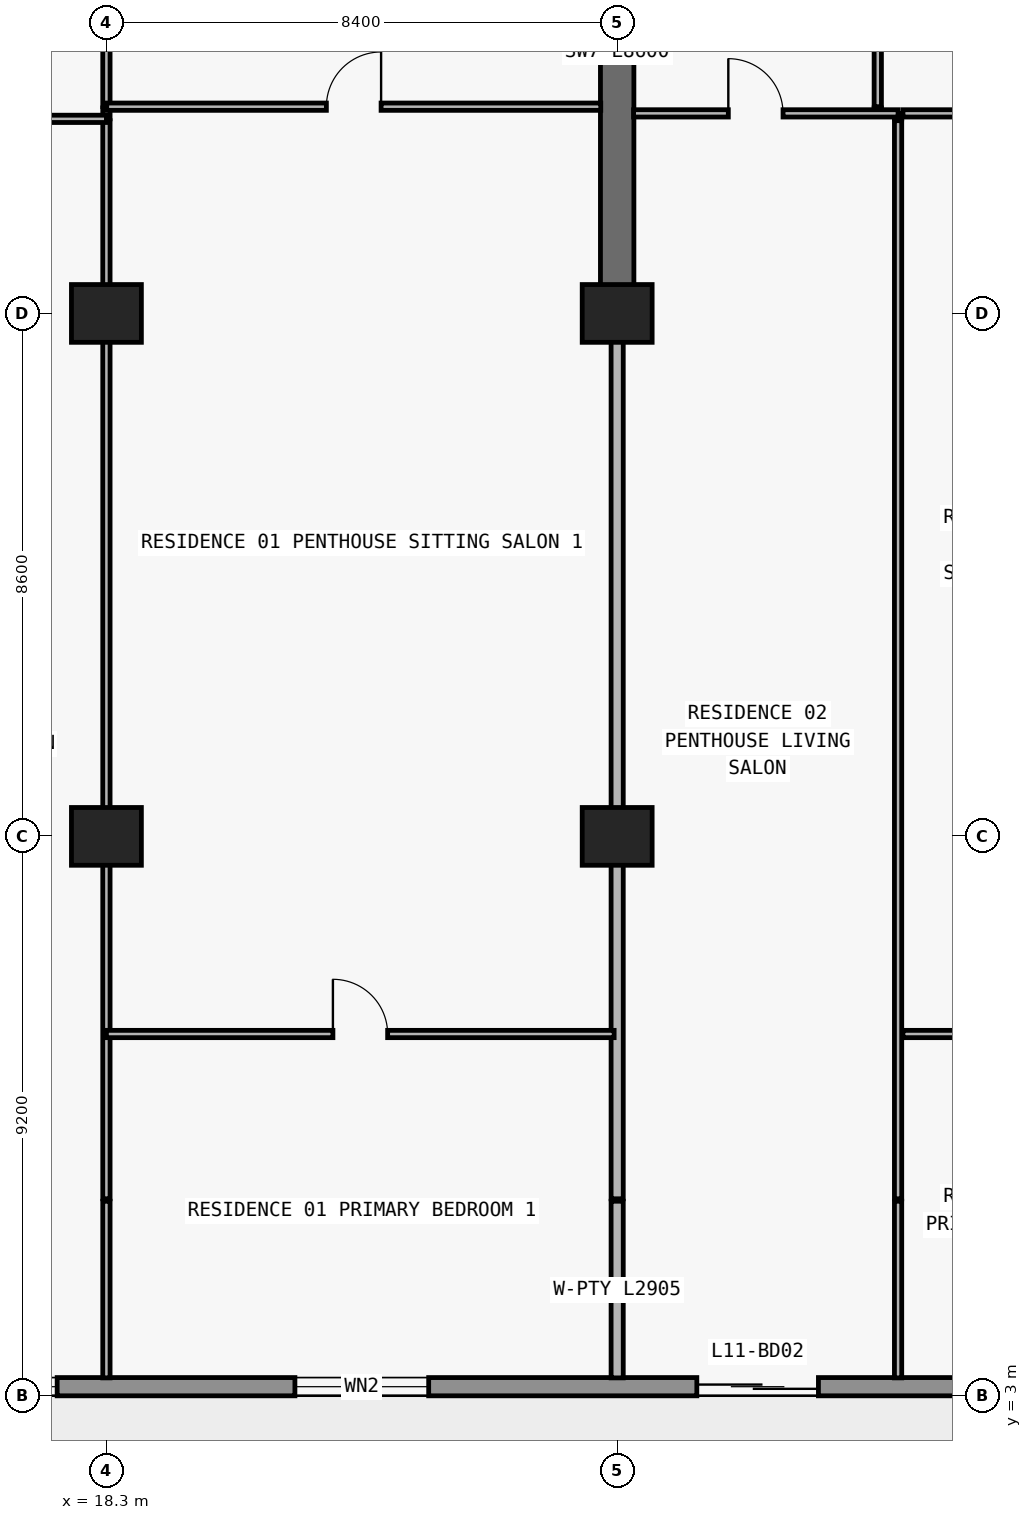
"""IFC4 building model, lengths in metres.
Left out: names, types, materials, properties, quantities, classifications, styles, units other than length and angle.
Written with IfcOpenShell. Run it as: python <this file> out.ifc"""

import sys

from ifc_helpers import new_model, si_unit, direction, frame, frame_2d, origin, origin_2d, place, context, subcontext, project, spatial, rectangle, extrude, element, fill, save


model = new_model("IFC4")
c1 = context("Model", 3, precision=1e-05, world=origin(), true_north=direction((0.0, 1.0)))
c2 = subcontext(c1, "Body", "Model", "MODEL_VIEW")
j1 = project(units=[si_unit("LENGTHUNIT", "METRE"), si_unit("PLANEANGLEUNIT", "RADIAN")], contexts=[c1])
p1 = place(None, origin())
s1 = spatial("IfcSite", under=j1, at=p1, CompositionType="ELEMENT")
p2 = place(p1, origin())
s2 = spatial("IfcBuilding", under=s1, at=p2, CompositionType="ELEMENT")
p3 = place(p2, frame((0.0, 0.0, 46.5)))
s3 = spatial("IfcBuildingStorey", under=s2, at=p3, CompositionType="ELEMENT", Elevation=46.5)
for number, where, z_axis, x_axis in (
    (1, (18.3, 12.2, 0.0), (0.0, 0.0, 1.0), (1.0, 0.0, 0.0)),
    (2, (26.7, 12.2, 0.0), (0.0, 0.0, 1.0), (1.0, 0.0, 0.0)),
    (3, (18.3, 20.8, 0.0), (0.0, 0.0, 1.0), (1.0, 0.0, 0.0)),
    (4, (26.7, 20.8, 0.0), (0.0, 0.0, 1.0), (1.0, 0.0, 0.0)),
):
    element("IfcColumn", number, at=place(p3, frame(where, z_axis=z_axis, x_axis=x_axis)), inside=s3, PredefinedType="COLUMN", context=c2, shape_type="SweptSolid", body=[
        extrude(rectangle(XDim=1.15, YDim=0.95, at=origin_2d()), origin(), (0.0, 0.0, 1.0), 3.05),
    ])
p4 = place(p3, frame((26.7, 20.8, 0.0), z_axis=(0.0, 0.0, 1.0), x_axis=(0.0, 1.0, 0.0)))
e5 = element("IfcWall", 5, at=p4, inside=s3, PredefinedType="SHEAR", context=c2, shape_type="SweptSolid", body=[
    extrude(rectangle(XDim=8.6, YDim=0.55, at=frame_2d((4.3, 0.0))), origin(), (0.0, 0.0, 1.0), 3.05),
])
p5 = place(p3, frame((72.7, 3.15, 0.0), z_axis=(0.0, 0.0, 1.0), x_axis=(-1.0, 0.0, 0.0)))
e6 = element("IfcWall", 6, at=p5, inside=s3, PredefinedType="STANDARD", context=c2, shape_type="SweptSolid", body=[
    extrude(rectangle(XDim=67.6, YDim=0.3, at=frame_2d((33.8, 0.0))), origin(), (0.0, 0.0, 1.0), 3.05),
])
p6 = place(p5, frame((59.89, 0.0, 0.0)))
e7 = element("IfcOpeningElement", 7, at=p6, cuts=e6, PredefinedType="OPENING", context=c2, shape_type="SweptSolid", body=[
    extrude(rectangle(XDim=2.0, YDim=2.3, at=frame_2d((1.0, 1.15))), frame((0.0, 0.16, 0.0), z_axis=(0.0, -1.0, 0.0), x_axis=(1.0, 0.0, 0.0)), (0.0, 0.0, 1.0), 0.32),
])
p7 = place(p5, frame((55.21, 0.0, 0.65)))
e8 = element("IfcOpeningElement", 8, at=p7, cuts=e6, PredefinedType="OPENING", context=c2, shape_type="SweptSolid", body=[
    extrude(rectangle(XDim=2.6, YDim=1.85, at=frame_2d((1.3, 0.925))), frame((0.0, 0.16, 0.0), z_axis=(0.0, -1.0, 0.0), x_axis=(1.0, 0.0, 0.0)), (0.0, 0.0, 1.0), 0.32),
])
p8 = place(p5, frame((49.1, 0.0, 0.85)))
e9 = element("IfcOpeningElement", 9, at=p8, cuts=e6, PredefinedType="OPENING", context=c2, shape_type="SweptSolid", body=[
    extrude(rectangle(XDim=2.2, YDim=1.55, at=frame_2d((1.1, 0.775))), frame((0.0, 0.16, 0.0), z_axis=(0.0, -1.0, 0.0), x_axis=(1.0, 0.0, 0.0)), (0.0, 0.0, 1.0), 0.32),
])
p9 = place(p5, frame((42.69, 0.0, 0.0)))
e10 = element("IfcOpeningElement", 10, at=p9, cuts=e6, PredefinedType="OPENING", context=c2, shape_type="SweptSolid", body=[
    extrude(rectangle(XDim=2.0, YDim=2.3, at=frame_2d((1.0, 1.15))), frame((0.0, 0.16, 0.0), z_axis=(0.0, -1.0, 0.0), x_axis=(1.0, 0.0, 0.0)), (0.0, 0.0, 1.0), 0.32),
])
p10 = place(p5, frame((38.59, 0.0, 0.85)))
e11 = element("IfcOpeningElement", 11, at=p10, cuts=e6, PredefinedType="OPENING", context=c2, shape_type="SweptSolid", body=[
    extrude(rectangle(XDim=1.8, YDim=1.55, at=frame_2d((0.9, 0.775))), frame((0.0, 0.16, 0.0), z_axis=(0.0, -1.0, 0.0), x_axis=(1.0, 0.0, 0.0)), (0.0, 0.0, 1.0), 0.32),
])
p11 = place(p5, frame((30.914, 0.0, 0.85)))
e12 = element("IfcOpeningElement", 12, at=p11, cuts=e6, PredefinedType="OPENING", context=c2, shape_type="SweptSolid", body=[
    extrude(rectangle(XDim=2.2, YDim=1.55, at=frame_2d((1.1, 0.775))), frame((0.0, 0.16, 0.0), z_axis=(0.0, -1.0, 0.0), x_axis=(1.0, 0.0, 0.0)), (0.0, 0.0, 1.0), 0.32),
])
p12 = place(p5, frame((26.69, 0.0, 0.0)))
e13 = element("IfcOpeningElement", 13, at=p12, cuts=e6, PredefinedType="OPENING", context=c2, shape_type="SweptSolid", body=[
    extrude(rectangle(XDim=2.0, YDim=2.3, at=frame_2d((1.0, 1.15))), frame((0.0, 0.16, 0.0), z_axis=(0.0, -1.0, 0.0), x_axis=(1.0, 0.0, 0.0)), (0.0, 0.0, 1.0), 0.32),
])
p13 = place(p5, frame((22.59, 0.0, 0.85)))
e14 = element("IfcOpeningElement", 14, at=p13, cuts=e6, PredefinedType="OPENING", context=c2, shape_type="SweptSolid", body=[
    extrude(rectangle(XDim=1.8, YDim=1.55, at=frame_2d((0.9, 0.775))), frame((0.0, 0.16, 0.0), z_axis=(0.0, -1.0, 0.0), x_axis=(1.0, 0.0, 0.0)), (0.0, 0.0, 1.0), 0.32),
])
p14 = place(p5, frame((18.69, 0.0, 0.0)))
e15 = element("IfcOpeningElement", 15, at=p14, cuts=e6, PredefinedType="OPENING", context=c2, shape_type="SweptSolid", body=[
    extrude(rectangle(XDim=2.0, YDim=2.3, at=frame_2d((1.0, 1.15))), frame((0.0, 0.16, 0.0), z_axis=(0.0, -1.0, 0.0), x_axis=(1.0, 0.0, 0.0)), (0.0, 0.0, 1.0), 0.32),
])
p15 = place(p5, frame((14.01, 0.0, 0.65)))
e16 = element("IfcOpeningElement", 16, at=p15, cuts=e6, PredefinedType="OPENING", context=c2, shape_type="SweptSolid", body=[
    extrude(rectangle(XDim=2.6, YDim=1.85, at=frame_2d((1.3, 0.925))), frame((0.0, 0.16, 0.0), z_axis=(0.0, -1.0, 0.0), x_axis=(1.0, 0.0, 0.0)), (0.0, 0.0, 1.0), 0.32),
])
p16 = place(p5, frame((7.9, 0.0, 0.85)))
e17 = element("IfcOpeningElement", 17, at=p16, cuts=e6, PredefinedType="OPENING", context=c2, shape_type="SweptSolid", body=[
    extrude(rectangle(XDim=2.2, YDim=1.55, at=frame_2d((1.1, 0.775))), frame((0.0, 0.16, 0.0), z_axis=(0.0, -1.0, 0.0), x_axis=(1.0, 0.0, 0.0)), (0.0, 0.0, 1.0), 0.32),
])
p17 = place(p3, frame((18.3, 3.295, 0.0), z_axis=(0.0, 0.0, 1.0), x_axis=(0.0, 1.0, 0.0)))
e18 = element("IfcWall", 18, at=p17, inside=s3, PredefinedType="PARTITIONING", context=c2, shape_type="SweptSolid", body=[
    extrude(rectangle(XDim=2.905, YDim=0.12, at=frame_2d((1.453, 0.0))), origin(), (0.0, 0.0, 1.0), 3.05),
])
p18 = place(p3, frame((18.3, 6.24, 0.0), z_axis=(0.0, 0.0, 1.0), x_axis=(0.0, 1.0, 0.0)))
e19 = element("IfcWall", 19, at=p18, inside=s3, PredefinedType="PARTITIONING", context=c2, shape_type="SweptSolid", body=[
    extrude(rectangle(XDim=17.73, YDim=0.12, at=frame_2d((8.865, 0.0))), origin(), (0.0, 0.0, 1.0), 2.11),
])
p19 = place(p3, frame((18.3, 24.0, 0.0), z_axis=(0.0, 0.0, 1.0), x_axis=(0.0, 1.0, 0.0)))
e20 = element("IfcWall", 20, at=p19, inside=s3, PredefinedType="PARTITIONING", context=c2, shape_type="SweptSolid", body=[
    extrude(rectangle(XDim=0.18, YDim=0.12, at=frame_2d((0.09, 0.0))), origin(), (0.0, 0.0, 1.0), 2.11),
])
p20 = place(p3, frame((18.3, 24.2, 0.0), z_axis=(0.0, 0.0, 1.0), x_axis=(0.0, 1.0, 0.0)))
e21 = element("IfcWall", 21, at=p20, inside=s3, PredefinedType="PARTITIONING", context=c2, shape_type="SweptSolid", body=[
    extrude(rectangle(XDim=4.38, YDim=0.12, at=frame_2d((2.19, 0.0))), origin(), (0.0, 0.0, 1.0), 2.11),
])
p21 = place(p20, frame((1.74, 0.0, 0.0)))
e22 = element("IfcOpeningElement", 22, at=p21, cuts=e21, PredefinedType="OPENING", context=c2, shape_type="SweptSolid", body=[
    extrude(rectangle(XDim=0.9, YDim=2.06, at=frame_2d((0.45, 1.03))), frame((0.0, 0.07, 0.0), z_axis=(0.0, -1.0, 0.0), x_axis=(1.0, 0.0, 0.0)), (0.0, 0.0, 1.0), 0.14),
])
p22 = place(p3, frame((26.7, 3.295, 0.0), z_axis=(0.0, 0.0, 1.0), x_axis=(0.0, 1.0, 0.0)))
e23 = element("IfcWall", 23, at=p22, inside=s3, PredefinedType="PARTITIONING", context=c2, shape_type="SweptSolid", body=[
    extrude(rectangle(XDim=2.905, YDim=0.2, at=frame_2d((1.453, 0.0))), origin(), (0.0, 0.0, 1.0), 3.05),
])
p23 = place(p3, frame((26.7, 6.24, 0.0), z_axis=(0.0, 0.0, 1.0), x_axis=(0.0, 1.0, 0.0)))
e24 = element("IfcWall", 24, at=p23, inside=s3, PredefinedType="PARTITIONING", context=c2, shape_type="SweptSolid", body=[
    extrude(rectangle(XDim=14.555, YDim=0.2, at=frame_2d((7.277, 0.0))), origin(), (0.0, 0.0, 1.0), 2.11),
])
p24 = place(p3, frame((30.986, 24.09, 0.0), z_axis=(0.0, 0.0, 1.0), x_axis=(0.0, 1.0, 0.0)))
e25 = element("IfcWall", 25, at=p24, inside=s3, PredefinedType="PARTITIONING", context=c2, shape_type="SweptSolid", body=[
    extrude(rectangle(XDim=0.09, YDim=0.12, at=frame_2d((0.045, 0.0))), origin(), (0.0, 0.0, 1.0), 3.05),
])
p25 = place(p3, frame((30.986, 24.2, 0.0), z_axis=(0.0, 0.0, 1.0), x_axis=(0.0, 1.0, 0.0)))
e26 = element("IfcWall", 26, at=p25, inside=s3, PredefinedType="PARTITIONING", context=c2, shape_type="SweptSolid", body=[
    extrude(rectangle(XDim=4.38, YDim=0.12, at=frame_2d((2.19, 0.0))), origin(), (0.0, 0.0, 1.0), 3.05),
])
p26 = place(p25, frame((1.74, 0.0, 0.0)))
e27 = element("IfcOpeningElement", 27, at=p26, cuts=e26, PredefinedType="OPENING", context=c2, shape_type="SweptSolid", body=[
    extrude(rectangle(XDim=0.9, YDim=2.15, at=frame_2d((0.45, 1.075))), frame((0.0, 0.07, 0.0), z_axis=(0.0, -1.0, 0.0), x_axis=(1.0, 0.0, 0.0)), (0.0, 0.0, 1.0), 0.14),
])
p27 = place(p3, frame((31.32, 3.295, 0.0), z_axis=(0.0, 0.0, 1.0), x_axis=(0.0, 1.0, 0.0)))
e28 = element("IfcWall", 28, at=p27, inside=s3, PredefinedType="PARTITIONING", context=c2, shape_type="SweptSolid", body=[
    extrude(rectangle(XDim=2.905, YDim=0.12, at=frame_2d((1.453, 0.0))), origin(), (0.0, 0.0, 1.0), 3.05),
])
p28 = place(p3, frame((31.32, 6.24, 0.0), z_axis=(0.0, 0.0, 1.0), x_axis=(0.0, 1.0, 0.0)))
e29 = element("IfcWall", 29, at=p28, inside=s3, PredefinedType="PARTITIONING", context=c2, shape_type="SweptSolid", body=[
    extrude(rectangle(XDim=17.73, YDim=0.12, at=frame_2d((8.865, 0.0))), origin(), (0.0, 0.0, 1.0), 3.05),
])
p29 = place(p3, frame((31.32, 24.0, 0.0), z_axis=(0.0, 0.0, 1.0), x_axis=(0.0, 1.0, 0.0)))
e30 = element("IfcWall", 30, at=p29, inside=s3, PredefinedType="PARTITIONING", context=c2, shape_type="SweptSolid", body=[
    extrude(rectangle(XDim=0.09, YDim=0.12, at=frame_2d((0.045, 0.0))), origin(), (0.0, 0.0, 1.0), 3.05),
])
p30 = place(p3, frame((18.3, 8.95, 0.0), z_axis=(0.0, 0.0, 1.0), x_axis=(1.0, 0.0, 0.0)))
e31 = element("IfcWall", 31, at=p30, inside=s3, PredefinedType="PARTITIONING", context=c2, shape_type="SweptSolid", body=[
    extrude(rectangle(XDim=8.35, YDim=0.12, at=frame_2d((4.175, 0.0))), origin(), (0.0, 0.0, 1.0), 3.05),
])
p31 = place(p30, frame((3.725, 0.0, 0.0)))
e32 = element("IfcOpeningElement", 32, at=p31, cuts=e31, PredefinedType="OPENING", context=c2, shape_type="SweptSolid", body=[
    extrude(rectangle(XDim=0.9, YDim=2.15, at=frame_2d((0.45, 1.075))), frame((0.0, 0.07, 0.0), z_axis=(0.0, -1.0, 0.0), x_axis=(1.0, 0.0, 0.0)), (0.0, 0.0, 1.0), 0.14),
])
p32 = place(p3, frame((31.4, 8.95, 0.0), z_axis=(0.0, 0.0, 1.0), x_axis=(1.0, 0.0, 0.0)))
e33 = element("IfcWall", 33, at=p32, inside=s3, PredefinedType="PARTITIONING", context=c2, shape_type="SweptSolid", body=[
    extrude(rectangle(XDim=3.7, YDim=0.12, at=frame_2d((1.85, 0.0))), origin(), (0.0, 0.0, 1.0), 3.05),
])
p33 = place(p32, frame((1.4, 0.0, 0.0)))
e34 = element("IfcOpeningElement", 34, at=p33, cuts=e33, PredefinedType="OPENING", context=c2, shape_type="SweptSolid", body=[
    extrude(rectangle(XDim=0.9, YDim=2.15, at=frame_2d((0.45, 1.075))), frame((0.0, 0.07, 0.0), z_axis=(0.0, -1.0, 0.0), x_axis=(1.0, 0.0, 0.0)), (0.0, 0.0, 1.0), 0.14),
])
p34 = place(p3, frame((9.9, 24.0, 0.0), z_axis=(0.0, 0.0, 1.0), x_axis=(1.0, 0.0, 0.0)))
e35 = element("IfcWall", 35, at=p34, inside=s3, PredefinedType="PARTITIONING", context=c2, shape_type="SweptSolid", body=[
    extrude(rectangle(XDim=8.4, YDim=0.12, at=frame_2d((4.2, 0.0))), origin(), (0.0, 0.0, 1.0), 3.05),
])
p35 = place(p34, frame((1.44, 0.0, 0.0)))
e36 = element("IfcOpeningElement", 36, at=p35, cuts=e35, PredefinedType="OPENING", context=c2, shape_type="SweptSolid", body=[
    extrude(rectangle(XDim=0.9, YDim=2.15, at=frame_2d((0.45, 1.075))), frame((0.0, 0.07, 0.0), z_axis=(0.0, -1.0, 0.0), x_axis=(1.0, 0.0, 0.0)), (0.0, 0.0, 1.0), 0.14),
])
p36 = place(p3, frame((26.97, 24.09, 0.0), z_axis=(0.0, 0.0, 1.0), x_axis=(1.0, 0.0, 0.0)))
e37 = element("IfcWall", 37, at=p36, inside=s3, PredefinedType="PARTITIONING", context=c2, shape_type="SweptSolid", body=[
    extrude(rectangle(XDim=4.35, YDim=0.12, at=frame_2d((2.175, 0.0))), origin(), (0.0, 0.0, 1.0), 3.05),
])
p37 = place(p36, frame((1.558, 0.0, 0.0)))
e38 = element("IfcOpeningElement", 38, at=p37, cuts=e37, PredefinedType="OPENING", context=c2, shape_type="SweptSolid", body=[
    extrude(rectangle(XDim=0.9, YDim=2.15, at=frame_2d((0.45, 1.075))), frame((0.0, 0.07, 0.0), z_axis=(0.0, -1.0, 0.0), x_axis=(1.0, 0.0, 0.0)), (0.0, 0.0, 1.0), 0.14),
])
p38 = place(p3, frame((31.4, 24.09, 0.0), z_axis=(0.0, 0.0, 1.0), x_axis=(1.0, 0.0, 0.0)))
e39 = element("IfcWall", 39, at=p38, inside=s3, PredefinedType="PARTITIONING", context=c2, shape_type="SweptSolid", body=[
    extrude(rectangle(XDim=3.7, YDim=0.12, at=frame_2d((1.85, 0.0))), origin(), (0.0, 0.0, 1.0), 3.05),
])
p39 = place(p38, frame((1.4, 0.0, 0.0)))
e40 = element("IfcOpeningElement", 40, at=p39, cuts=e39, PredefinedType="OPENING", context=c2, shape_type="SweptSolid", body=[
    extrude(rectangle(XDim=0.9, YDim=2.15, at=frame_2d((0.45, 1.075))), frame((0.0, 0.07, 0.0), z_axis=(0.0, -1.0, 0.0), x_axis=(1.0, 0.0, 0.0)), (0.0, 0.0, 1.0), 0.14),
])
p40 = place(p3, frame((18.305, 24.2, 0.0), z_axis=(0.0, 0.0, 1.0), x_axis=(1.0, 0.0, 0.0)))
e41 = element("IfcWall", 41, at=p40, inside=s3, PredefinedType="PARTITIONING", context=c2, shape_type="SweptSolid", body=[
    extrude(rectangle(XDim=8.125, YDim=0.12, at=frame_2d((4.062, 0.0))), origin(), (0.0, 0.0, 1.0), 3.05),
])
p41 = place(p40, frame((3.613, 0.0, 0.0)))
e42 = element("IfcOpeningElement", 42, at=p41, cuts=e41, PredefinedType="OPENING", context=c2, shape_type="SweptSolid", body=[
    extrude(rectangle(XDim=0.9, YDim=2.15, at=frame_2d((0.45, 1.075))), frame((0.0, 0.07, 0.0), z_axis=(0.0, -1.0, 0.0), x_axis=(1.0, 0.0, 0.0)), (0.0, 0.0, 1.0), 0.14),
])
p42 = place(p7, origin())
e43 = element("IfcWindow", 43, at=p42, inside=s3, PartitioningType="SINGLE_PANEL", PredefinedType="WINDOW", context=c2, shape_type="SweptSolid", body=[
    extrude(rectangle(XDim=2.6, YDim=1.85, at=frame_2d((1.3, 0.925))), frame((0.0, 0.03, 0.0), z_axis=(0.0, -1.0, 0.0), x_axis=(1.0, 0.0, 0.0)), (0.0, 0.0, 1.0), 0.06),
])
fill(e8, e43)
p43 = place(p8, origin())
e44 = element("IfcWindow", 44, at=p43, inside=s3, PartitioningType="SINGLE_PANEL", PredefinedType="WINDOW", context=c2, shape_type="SweptSolid", body=[
    extrude(rectangle(XDim=2.2, YDim=1.55, at=frame_2d((1.1, 0.775))), frame((0.0, 0.03, 0.0), z_axis=(0.0, -1.0, 0.0), x_axis=(1.0, 0.0, 0.0)), (0.0, 0.0, 1.0), 0.06),
])
fill(e9, e44)
p44 = place(p9, origin())
e45 = element("IfcDoor", 45, at=p44, inside=s3, OperationType="DOUBLE_DOOR_SLIDING", PredefinedType="DOOR", context=c2, shape_type="SweptSolid", body=[
    extrude(rectangle(XDim=2.0, YDim=2.3, at=frame_2d((1.0, 1.15))), frame((0.0, 0.025, 0.0), z_axis=(0.0, -1.0, 0.0), x_axis=(1.0, 0.0, 0.0)), (0.0, 0.0, 1.0), 0.05),
])
fill(e10, e45)
p45 = place(p41, origin())
e46 = element("IfcDoor", 46, at=p45, inside=s3, OperationType="SINGLE_SWING_RIGHT", PredefinedType="DOOR", context=c2, shape_type="SweptSolid", body=[
    extrude(rectangle(XDim=0.9, YDim=2.15, at=frame_2d((0.45, 1.075))), frame((0.0, 0.025, 0.0), z_axis=(0.0, -1.0, 0.0), x_axis=(1.0, 0.0, 0.0)), (0.0, 0.0, 1.0), 0.05),
])
fill(e42, e46)
p46 = place(p31, origin())
e47 = element("IfcDoor", 47, at=p46, inside=s3, OperationType="SINGLE_SWING_LEFT", PredefinedType="DOOR", context=c2, shape_type="SweptSolid", body=[
    extrude(rectangle(XDim=0.9, YDim=2.15, at=frame_2d((0.45, 1.075))), frame((0.0, 0.025, 0.0), z_axis=(0.0, -1.0, 0.0), x_axis=(1.0, 0.0, 0.0)), (0.0, 0.0, 1.0), 0.05),
])
fill(e32, e47)
p47 = place(p37, origin())
e48 = element("IfcDoor", 48, at=p47, inside=s3, OperationType="SINGLE_SWING_LEFT", PredefinedType="DOOR", context=c2, shape_type="SweptSolid", body=[
    extrude(rectangle(XDim=0.9, YDim=2.15, at=frame_2d((0.45, 1.075))), frame((0.0, 0.025, 0.0), z_axis=(0.0, -1.0, 0.0), x_axis=(1.0, 0.0, 0.0)), (0.0, 0.0, 1.0), 0.05),
])
fill(e38, e48)
save(model, sys.argv[1])
